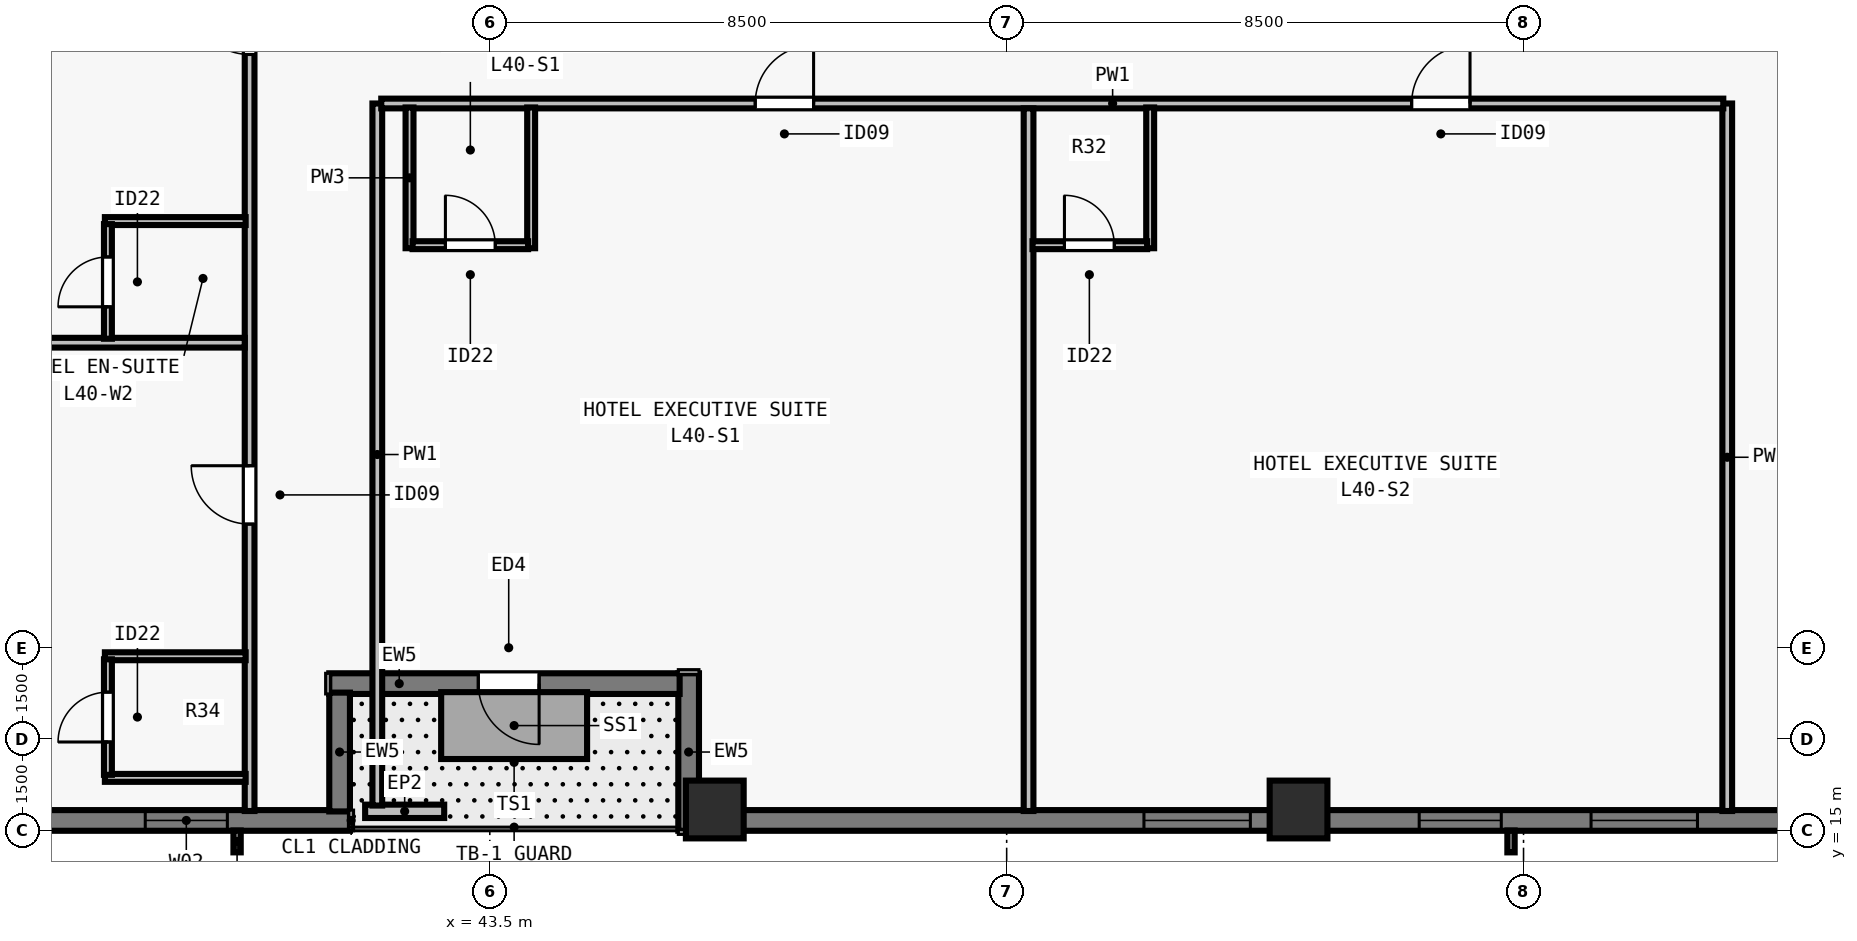
"""IFC4 building model, lengths in metres.
Left out: names, types, materials, properties, quantities, classifications, styles, units other than length and angle.
Written with IfcOpenShell. Run it as: python <this file> out.ifc"""

import sys

from ifc_helpers import new_model, si_unit, direction, frame, frame_2d, origin, origin_2d, place, context, subcontext, project, spatial, rectangle, extrude, element, fill, save


model = new_model("IFC4")
c1 = context("Model", 3, precision=1e-05, world=origin(), true_north=direction((0.0, 1.0)))
c2 = subcontext(c1, "Body", "Model", "MODEL_VIEW")
j1 = project(units=[si_unit("LENGTHUNIT", "METRE"), si_unit("PLANEANGLEUNIT", "RADIAN")], contexts=[c1])
p1 = place(None, origin())
s1 = spatial("IfcSite", under=j1, at=p1, CompositionType="ELEMENT")
p2 = place(p1, origin())
s2 = spatial("IfcBuilding", under=s1, at=p2, CompositionType="ELEMENT")
p3 = place(p2, frame((0.0, 0.0, 148.0)))
s3 = spatial("IfcBuildingStorey", under=s2, at=p3, CompositionType="ELEMENT", Elevation=148.0)
for number, where, z_axis, x_axis in (
    (1, (47.2, 15.35, 0.0), (0.0, 0.0, 1.0), (1.0, 0.0, 0.0)),
    (2, (56.8, 15.35, 0.0), (0.0, 0.0, 1.0), (1.0, 0.0, 0.0)),
):
    element("IfcColumn", number, at=place(p3, frame(where, z_axis=z_axis, x_axis=x_axis)), inside=s3, PredefinedType="COLUMN", context=c2, shape_type="SweptSolid", body=[
        extrude(rectangle(XDim=0.95, YDim=0.95, at=origin_2d()), origin(), (0.0, 0.0, 1.0), 3.5),
    ])
p4 = place(p3, frame((41.2, 15.17, 0.0), z_axis=(0.0, 0.0, 1.0), x_axis=(-1.0, 0.0, 0.0)))
e3 = element("IfcWall", 3, at=p4, inside=s3, PredefinedType="SOLIDWALL", context=c2, shape_type="SweptSolid", body=[
    extrude(rectangle(XDim=8.882, YDim=0.34, at=frame_2d((4.441, 0.0))), origin(), (0.0, 0.0, 1.0), 3.28),
])
p5 = place(p4, frame((2.016, 0.0, 0.8)))
e4 = element("IfcOpeningElement", 4, at=p5, cuts=e3, PredefinedType="OPENING", context=c2, shape_type="SweptSolid", body=[
    extrude(rectangle(XDim=1.35, YDim=1.66, at=frame_2d((0.675, 0.83))), frame((0.0, 0.18, 0.0), z_axis=(0.0, -1.0, 0.0), x_axis=(1.0, 0.0, 0.0)), (0.0, 0.0, 1.0), 0.36),
])
p6 = place(p3, frame((72.0, 15.17, 0.0), z_axis=(0.0, 0.0, 1.0), x_axis=(-1.0, 0.0, 0.0)))
e5 = element("IfcWall", 5, at=p6, inside=s3, PredefinedType="SOLIDWALL", context=c2, shape_type="SweptSolid", body=[
    extrude(rectangle(XDim=25.082, YDim=0.34, at=frame_2d((12.541, 0.0))), origin(), (0.0, 0.0, 1.0), 3.28),
])
p7 = place(p6, frame((4.063, 0.0, 0.8)))
e6 = element("IfcOpeningElement", 6, at=p7, cuts=e5, PredefinedType="OPENING", context=c2, shape_type="SweptSolid", body=[
    extrude(rectangle(XDim=1.35, YDim=1.66, at=frame_2d((0.675, 0.83))), frame((0.0, 0.18, 0.0), z_axis=(0.0, -1.0, 0.0), x_axis=(1.0, 0.0, 0.0)), (0.0, 0.0, 1.0), 0.36),
])
p8 = place(p6, frame((8.64, 0.0, 0.8)))
e7 = element("IfcOpeningElement", 7, at=p8, cuts=e5, PredefinedType="OPENING", context=c2, shape_type="SweptSolid", body=[
    extrude(rectangle(XDim=1.75, YDim=1.66, at=frame_2d((0.875, 0.83))), frame((0.0, 0.18, 0.0), z_axis=(0.0, -1.0, 0.0), x_axis=(1.0, 0.0, 0.0)), (0.0, 0.0, 1.0), 0.36),
])
p9 = place(p6, frame((11.866, 0.0, 0.8)))
e8 = element("IfcOpeningElement", 8, at=p9, cuts=e5, PredefinedType="OPENING", context=c2, shape_type="SweptSolid", body=[
    extrude(rectangle(XDim=1.35, YDim=1.66, at=frame_2d((0.675, 0.83))), frame((0.0, 0.18, 0.0), z_axis=(0.0, -1.0, 0.0), x_axis=(1.0, 0.0, 0.0)), (0.0, 0.0, 1.0), 0.36),
])
p10 = place(p6, frame((15.992, 0.0, 0.8)))
e9 = element("IfcOpeningElement", 9, at=p10, cuts=e5, PredefinedType="OPENING", context=c2, shape_type="SweptSolid", body=[
    extrude(rectangle(XDim=1.75, YDim=1.66, at=frame_2d((0.875, 0.83))), frame((0.0, 0.18, 0.0), z_axis=(0.0, -1.0, 0.0), x_axis=(1.0, 0.0, 0.0)), (0.0, 0.0, 1.0), 0.36),
])
p11 = place(p3, frame((46.77, 15.0, 0.0), z_axis=(0.0, 0.0, 1.0), x_axis=(0.0, 1.0, 0.0)))
e10 = element("IfcWall", 10, at=p11, inside=s3, PredefinedType="SOLIDWALL", context=c2, shape_type="SweptSolid", body=[
    extrude(rectangle(XDim=2.59, YDim=0.34, at=frame_2d((1.295, 0.0))), origin(), (0.0, 0.0, 1.0), 3.28),
])
p12 = place(p3, frame((46.622, 17.42, 0.0), z_axis=(0.0, 0.0, 1.0), x_axis=(-1.0, 0.0, 0.0)))
e11 = element("IfcWall", 11, at=p12, inside=s3, PredefinedType="SOLIDWALL", context=c2, shape_type="SweptSolid", body=[
    extrude(rectangle(XDim=5.762, YDim=0.34, at=frame_2d((2.881, 0.0))), origin(), (0.0, 0.0, 1.0), 3.28),
])
p13 = place(p12, frame((2.311, 0.0, 0.0)))
e12 = element("IfcOpeningElement", 12, at=p13, cuts=e11, PredefinedType="OPENING", context=c2, shape_type="SweptSolid", body=[
    extrude(rectangle(XDim=1.0, YDim=2.15, at=frame_2d((0.5, 1.075))), frame((0.0, 0.18, 0.0), z_axis=(0.0, -1.0, 0.0), x_axis=(1.0, 0.0, 0.0)), (0.0, 0.0, 1.0), 0.36),
])
p14 = place(p3, frame((41.03, 17.272, 0.0), z_axis=(0.0, 0.0, 1.0), x_axis=(0.0, -1.0, 0.0)))
e13 = element("IfcWall", 13, at=p14, inside=s3, PredefinedType="SOLIDWALL", context=c2, shape_type="SweptSolid", body=[
    extrude(rectangle(XDim=1.954, YDim=0.34, at=frame_2d((0.977, 0.0))), origin(), (0.0, 0.0, 1.0), 3.28),
])
p15 = place(p3, frame((41.45, 15.32, 0.0), z_axis=(0.0, 0.0, 1.0), x_axis=(1.0, 0.0, 0.0)))
e14 = element("IfcWall", 14, at=p15, inside=s3, PredefinedType="PARAPET", context=c2, shape_type="SweptSolid", body=[
    extrude(rectangle(XDim=1.3, YDim=0.22, at=frame_2d((0.65, 0.0))), origin(), (0.0, 0.0, 1.0), 0.55),
])
p16 = place(p3, frame((39.55, 15.325, 0.0), z_axis=(0.0, 0.0, 1.0), x_axis=(0.0, 1.0, 0.0)))
e15 = element("IfcWall", 15, at=p16, inside=s3, PredefinedType="PARTITIONING", context=c2, shape_type="SweptSolid", body=[
    extrude(rectangle(XDim=47.35, YDim=0.16, at=frame_2d((23.675, 0.0))), origin(), (0.0, 0.0, 1.0), 2.555),
])
p17 = place(p16, frame((4.718, 0.0, 0.0)))
e16 = element("IfcOpeningElement", 16, at=p17, cuts=e15, PredefinedType="OPENING", context=c2, shape_type="SweptSolid", body=[
    extrude(rectangle(XDim=0.96, YDim=2.15, at=frame_2d((0.48, 1.075))), frame((0.0, 0.09, 0.0), z_axis=(0.0, -1.0, 0.0), x_axis=(1.0, 0.0, 0.0)), (0.0, 0.0, 1.0), 0.18),
])
p18 = place(p16, frame((12.441, 0.0, 0.0)))
e17 = element("IfcOpeningElement", 17, at=p18, cuts=e15, PredefinedType="OPENING", context=c2, shape_type="SweptSolid", body=[
    extrude(rectangle(XDim=0.96, YDim=2.15, at=frame_2d((0.48, 1.075))), frame((0.0, 0.09, 0.0), z_axis=(0.0, -1.0, 0.0), x_axis=(1.0, 0.0, 0.0)), (0.0, 0.0, 1.0), 0.18),
])
p19 = place(p16, frame((20.301, 0.0, 0.0)))
e18 = element("IfcOpeningElement", 18, at=p19, cuts=e15, PredefinedType="OPENING", context=c2, shape_type="SweptSolid", body=[
    extrude(rectangle(XDim=0.96, YDim=2.15, at=frame_2d((0.48, 1.075))), frame((0.0, 0.09, 0.0), z_axis=(0.0, -1.0, 0.0), x_axis=(1.0, 0.0, 0.0)), (0.0, 0.0, 1.0), 0.18),
])
p20 = place(p16, frame((28.161, 0.0, 0.0)))
e19 = element("IfcOpeningElement", 19, at=p20, cuts=e15, PredefinedType="OPENING", context=c2, shape_type="SweptSolid", body=[
    extrude(rectangle(XDim=0.96, YDim=2.15, at=frame_2d((0.48, 1.075))), frame((0.0, 0.09, 0.0), z_axis=(0.0, -1.0, 0.0), x_axis=(1.0, 0.0, 0.0)), (0.0, 0.0, 1.0), 0.18),
])
p21 = place(p16, frame((36.021, 0.0, 0.0)))
e20 = element("IfcOpeningElement", 20, at=p21, cuts=e15, PredefinedType="OPENING", context=c2, shape_type="SweptSolid", body=[
    extrude(rectangle(XDim=0.96, YDim=2.15, at=frame_2d((0.48, 1.075))), frame((0.0, 0.09, 0.0), z_axis=(0.0, -1.0, 0.0), x_axis=(1.0, 0.0, 0.0)), (0.0, 0.0, 1.0), 0.18),
])
p22 = place(p16, frame((43.793, 0.0, 0.0)))
e21 = element("IfcOpeningElement", 21, at=p22, cuts=e15, PredefinedType="OPENING", context=c2, shape_type="SweptSolid", body=[
    extrude(rectangle(XDim=0.96, YDim=2.15, at=frame_2d((0.48, 1.075))), frame((0.0, 0.09, 0.0), z_axis=(0.0, -1.0, 0.0), x_axis=(1.0, 0.0, 0.0)), (0.0, 0.0, 1.0), 0.18),
])
p23 = place(p3, frame((41.65, 15.415, 0.0), z_axis=(0.0, 0.0, 1.0), x_axis=(0.0, 1.0, 0.0)))
e22 = element("IfcWall", 22, at=p23, inside=s3, PredefinedType="PARTITIONING", context=c2, shape_type="SweptSolid", body=[
    extrude(rectangle(XDim=11.545, YDim=0.16, at=frame_2d((5.772, 0.0))), origin(), (0.0, 0.0, 1.0), 3.28),
])
p24 = place(p3, frame((63.85, 15.325, 0.0), z_axis=(0.0, 0.0, 1.0), x_axis=(0.0, 1.0, 0.0)))
e23 = element("IfcWall", 23, at=p24, inside=s3, PredefinedType="PARTITIONING", context=c2, shape_type="SweptSolid", body=[
    extrude(rectangle(XDim=11.635, YDim=0.16, at=frame_2d((5.817, 0.0))), origin(), (0.0, 0.0, 1.0), 2.555),
])
p25 = place(p3, frame((41.715, 26.96, 0.0), z_axis=(0.0, 0.0, 1.0), x_axis=(1.0, 0.0, 0.0)))
e24 = element("IfcWall", 24, at=p25, inside=s3, PredefinedType="PARTITIONING", context=c2, shape_type="SweptSolid", body=[
    extrude(rectangle(XDim=22.07, YDim=0.16, at=frame_2d((11.035, 0.0))), origin(), (0.0, 0.0, 1.0), 3.28),
])
p26 = place(p25, frame((6.15, 0.0, 0.0)))
e25 = element("IfcOpeningElement", 25, at=p26, cuts=e24, PredefinedType="OPENING", context=c2, shape_type="SweptSolid", body=[
    extrude(rectangle(XDim=0.96, YDim=2.15, at=frame_2d((0.48, 1.075))), frame((0.0, 0.09, 0.0), z_axis=(0.0, -1.0, 0.0), x_axis=(1.0, 0.0, 0.0)), (0.0, 0.0, 1.0), 0.18),
])
p27 = place(p25, frame((16.945, 0.0, 0.0)))
e26 = element("IfcOpeningElement", 26, at=p27, cuts=e24, PredefinedType="OPENING", context=c2, shape_type="SweptSolid", body=[
    extrude(rectangle(XDim=0.96, YDim=2.15, at=frame_2d((0.48, 1.075))), frame((0.0, 0.09, 0.0), z_axis=(0.0, -1.0, 0.0), x_axis=(1.0, 0.0, 0.0)), (0.0, 0.0, 1.0), 0.18),
])
for number, where, z_axis, x_axis in (
    (27, (42.18, 24.58, 0.0), (0.0, 0.0, 1.0), (0.0, 1.0, 0.0)),
    (28, (44.18, 24.58, 0.0), (0.0, 0.0, 1.0), (0.0, 1.0, 0.0)),
):
    element("IfcWall", number, at=place(p3, frame(where, z_axis=z_axis, x_axis=x_axis)), inside=s3, PredefinedType="PLUMBINGWALL", context=c2, shape_type="SweptSolid", body=[
        extrude(rectangle(XDim=2.315, YDim=0.13, at=frame_2d((1.157, 0.0))), origin(), (0.0, 0.0, 1.0), 3.28),
    ])
p28 = place(p3, frame((42.23, 24.63, 0.0), z_axis=(0.0, 0.0, 1.0), x_axis=(1.0, 0.0, 0.0)))
e29 = element("IfcWall", 29, at=p28, inside=s3, PredefinedType="PLUMBINGWALL", context=c2, shape_type="SweptSolid", body=[
    extrude(rectangle(XDim=1.9, YDim=0.13, at=frame_2d((0.95, 0.0))), origin(), (0.0, 0.0, 1.0), 3.28),
])
p29 = place(p28, frame((0.54, 0.0, 0.0)))
e30 = element("IfcOpeningElement", 30, at=p29, cuts=e29, PredefinedType="OPENING", context=c2, shape_type="SweptSolid", body=[
    extrude(rectangle(XDim=0.82, YDim=2.1, at=frame_2d((0.41, 1.05))), frame((0.0, 0.075, 0.0), z_axis=(0.0, -1.0, 0.0), x_axis=(1.0, 0.0, 0.0)), (0.0, 0.0, 1.0), 0.15),
])
p30 = place(p3, frame((52.36, 15.325, 0.0), z_axis=(0.0, 0.0, 1.0), x_axis=(0.0, 1.0, 0.0)))
e31 = element("IfcWall", 31, at=p30, inside=s3, PredefinedType="PARTITIONING", context=c2, shape_type="SweptSolid", body=[
    extrude(rectangle(XDim=11.555, YDim=0.16, at=frame_2d((5.777, 0.0))), origin(), (0.0, 0.0, 1.0), 2.896),
])
p31 = place(p3, frame((54.36, 24.58, 0.0), z_axis=(0.0, 0.0, 1.0), x_axis=(0.0, 1.0, 0.0)))
e32 = element("IfcWall", 32, at=p31, inside=s3, PredefinedType="PLUMBINGWALL", context=c2, shape_type="SweptSolid", body=[
    extrude(rectangle(XDim=2.315, YDim=0.13, at=frame_2d((1.157, 0.0))), origin(), (0.0, 0.0, 1.0), 2.896),
])
p32 = place(p3, frame((52.425, 24.63, 0.0), z_axis=(0.0, 0.0, 1.0), x_axis=(1.0, 0.0, 0.0)))
e33 = element("IfcWall", 33, at=p32, inside=s3, PredefinedType="PLUMBINGWALL", context=c2, shape_type="SweptSolid", body=[
    extrude(rectangle(XDim=1.885, YDim=0.13, at=frame_2d((0.942, 0.0))), origin(), (0.0, 0.0, 1.0), 3.28),
])
p33 = place(p32, frame((0.525, 0.0, 0.0)))
e34 = element("IfcOpeningElement", 34, at=p33, cuts=e33, PredefinedType="OPENING", context=c2, shape_type="SweptSolid", body=[
    extrude(rectangle(XDim=0.82, YDim=2.1, at=frame_2d((0.41, 1.05))), frame((0.0, 0.075, 0.0), z_axis=(0.0, -1.0, 0.0), x_axis=(1.0, 0.0, 0.0)), (0.0, 0.0, 1.0), 0.15),
])
for number, where, z_axis, x_axis in (
    (35, (37.17, 15.87, 0.0), (0.0, 0.0, 1.0), (1.0, 0.0, 0.0)),
    (36, (37.17, 17.87, 0.0), (0.0, 0.0, 1.0), (1.0, 0.0, 0.0)),
):
    element("IfcWall", number, at=place(p3, frame(where, z_axis=z_axis, x_axis=x_axis)), inside=s3, PredefinedType="PLUMBINGWALL", context=c2, shape_type="SweptSolid", body=[
        extrude(rectangle(XDim=2.315, YDim=0.13, at=frame_2d((1.158, 0.0))), origin(), (0.0, 0.0, 1.0), 3.28),
    ])
p34 = place(p3, frame((37.22, 15.92, 0.0), z_axis=(0.0, 0.0, 1.0), x_axis=(0.0, 1.0, 0.0)))
e37 = element("IfcWall", 37, at=p34, inside=s3, PredefinedType="PLUMBINGWALL", context=c2, shape_type="SweptSolid", body=[
    extrude(rectangle(XDim=1.9, YDim=0.13, at=frame_2d((0.95, 0.0))), origin(), (0.0, 0.0, 1.0), 3.28),
])
p35 = place(p34, frame((0.54, 0.0, 0.0)))
e38 = element("IfcOpeningElement", 38, at=p35, cuts=e37, PredefinedType="OPENING", context=c2, shape_type="SweptSolid", body=[
    extrude(rectangle(XDim=0.82, YDim=2.1, at=frame_2d((0.41, 1.05))), frame((0.0, 0.075, 0.0), z_axis=(0.0, -1.0, 0.0), x_axis=(1.0, 0.0, 0.0)), (0.0, 0.0, 1.0), 0.15),
])
p36 = place(p3, frame((28.325, 23.027, 0.0), z_axis=(0.0, 0.0, 1.0), x_axis=(1.0, 0.0, 0.0)))
e39 = element("IfcWall", 39, at=p36, inside=s3, PredefinedType="PARTITIONING", context=c2, shape_type="SweptSolid", body=[
    extrude(rectangle(XDim=11.145, YDim=0.16, at=frame_2d((5.573, 0.0))), origin(), (0.0, 0.0, 1.0), 2.896),
])
p37 = place(p3, frame((37.17, 25.027, 0.0), z_axis=(0.0, 0.0, 1.0), x_axis=(1.0, 0.0, 0.0)))
e40 = element("IfcWall", 40, at=p37, inside=s3, PredefinedType="PLUMBINGWALL", context=c2, shape_type="SweptSolid", body=[
    extrude(rectangle(XDim=2.315, YDim=0.13, at=frame_2d((1.158, 0.0))), origin(), (0.0, 0.0, 1.0), 3.28),
])
p38 = place(p3, frame((37.22, 23.092, 0.0), z_axis=(0.0, 0.0, 1.0), x_axis=(0.0, 1.0, 0.0)))
e41 = element("IfcWall", 41, at=p38, inside=s3, PredefinedType="PLUMBINGWALL", context=c2, shape_type="SweptSolid", body=[
    extrude(rectangle(XDim=1.885, YDim=0.13, at=frame_2d((0.942, 0.0))), origin(), (0.0, 0.0, 1.0), 3.28),
])
p39 = place(p38, frame((0.525, 0.0, 0.0)))
e42 = element("IfcOpeningElement", 42, at=p39, cuts=e41, PredefinedType="OPENING", context=c2, shape_type="SweptSolid", body=[
    extrude(rectangle(XDim=0.82, YDim=2.1, at=frame_2d((0.41, 1.05))), frame((0.0, 0.075, 0.0), z_axis=(0.0, -1.0, 0.0), x_axis=(1.0, 0.0, 0.0)), (0.0, 0.0, 1.0), 0.15),
])
p40 = place(p5, origin())
e43 = element("IfcWindow", 43, at=p40, inside=s3, PartitioningType="SINGLE_PANEL", PredefinedType="WINDOW", context=c2, shape_type="SweptSolid", body=[
    extrude(rectangle(XDim=1.35, YDim=1.66, at=frame_2d((0.675, 0.83))), frame((0.0, -0.05, 0.0), z_axis=(0.0, -1.0, 0.0), x_axis=(1.0, 0.0, 0.0)), (0.0, 0.0, 1.0), 0.06),
])
fill(e4, e43)
p41 = place(p8, origin())
e44 = element("IfcWindow", 44, at=p41, inside=s3, PartitioningType="SINGLE_PANEL", PredefinedType="WINDOW", context=c2, shape_type="SweptSolid", body=[
    extrude(rectangle(XDim=1.75, YDim=1.66, at=frame_2d((0.875, 0.83))), frame((0.0, -0.05, 0.0), z_axis=(0.0, -1.0, 0.0), x_axis=(1.0, 0.0, 0.0)), (0.0, 0.0, 1.0), 0.06),
])
fill(e7, e44)
p42 = place(p9, origin())
e45 = element("IfcWindow", 45, at=p42, inside=s3, PartitioningType="SINGLE_PANEL", PredefinedType="WINDOW", context=c2, shape_type="SweptSolid", body=[
    extrude(rectangle(XDim=1.35, YDim=1.66, at=frame_2d((0.675, 0.83))), frame((0.0, -0.05, 0.0), z_axis=(0.0, -1.0, 0.0), x_axis=(1.0, 0.0, 0.0)), (0.0, 0.0, 1.0), 0.06),
])
fill(e8, e45)
p43 = place(p10, origin())
e46 = element("IfcWindow", 46, at=p43, inside=s3, PartitioningType="SINGLE_PANEL", PredefinedType="WINDOW", context=c2, shape_type="SweptSolid", body=[
    extrude(rectangle(XDim=1.75, YDim=1.66, at=frame_2d((0.875, 0.83))), frame((0.0, -0.05, 0.0), z_axis=(0.0, -1.0, 0.0), x_axis=(1.0, 0.0, 0.0)), (0.0, 0.0, 1.0), 0.06),
])
fill(e9, e46)
p44 = place(p13, origin())
e47 = element("IfcDoor", 47, at=p44, inside=s3, OperationType="SINGLE_SWING_LEFT", PredefinedType="DOOR", context=c2, shape_type="SweptSolid", body=[
    extrude(rectangle(XDim=1.0, YDim=2.15, at=frame_2d((0.5, 1.075))), frame((0.0, 0.025, 0.0), z_axis=(0.0, -1.0, 0.0), x_axis=(1.0, 0.0, 0.0)), (0.0, 0.0, 1.0), 0.05),
])
fill(e12, e47)
p45 = place(p29, origin())
e48 = element("IfcDoor", 48, at=p45, inside=s3, OperationType="SINGLE_SWING_LEFT", PredefinedType="DOOR", context=c2, shape_type="SweptSolid", body=[
    extrude(rectangle(XDim=0.82, YDim=2.1, at=frame_2d((0.41, 1.05))), frame((0.0, 0.025, 0.0), z_axis=(0.0, -1.0, 0.0), x_axis=(1.0, 0.0, 0.0)), (0.0, 0.0, 1.0), 0.05),
])
fill(e30, e48)
p46 = place(p26, origin())
e49 = element("IfcDoor", 49, at=p46, inside=s3, OperationType="SINGLE_SWING_RIGHT", PredefinedType="DOOR", context=c2, shape_type="SweptSolid", body=[
    extrude(rectangle(XDim=0.96, YDim=2.15, at=frame_2d((0.48, 1.075))), frame((0.0, 0.025, 0.0), z_axis=(0.0, -1.0, 0.0), x_axis=(1.0, 0.0, 0.0)), (0.0, 0.0, 1.0), 0.05),
])
fill(e25, e49)
p47 = place(p33, origin())
e50 = element("IfcDoor", 50, at=p47, inside=s3, OperationType="SINGLE_SWING_LEFT", PredefinedType="DOOR", context=c2, shape_type="SweptSolid", body=[
    extrude(rectangle(XDim=0.82, YDim=2.1, at=frame_2d((0.41, 1.05))), frame((0.0, 0.025, 0.0), z_axis=(0.0, -1.0, 0.0), x_axis=(1.0, 0.0, 0.0)), (0.0, 0.0, 1.0), 0.05),
])
fill(e34, e50)
p48 = place(p27, origin())
e51 = element("IfcDoor", 51, at=p48, inside=s3, OperationType="SINGLE_SWING_RIGHT", PredefinedType="DOOR", context=c2, shape_type="SweptSolid", body=[
    extrude(rectangle(XDim=0.96, YDim=2.15, at=frame_2d((0.48, 1.075))), frame((0.0, 0.025, 0.0), z_axis=(0.0, -1.0, 0.0), x_axis=(1.0, 0.0, 0.0)), (0.0, 0.0, 1.0), 0.05),
])
fill(e26, e51)
p49 = place(p35, origin())
e52 = element("IfcDoor", 52, at=p49, inside=s3, OperationType="SINGLE_SWING_LEFT", PredefinedType="DOOR", context=c2, shape_type="SweptSolid", body=[
    extrude(rectangle(XDim=0.82, YDim=2.1, at=frame_2d((0.41, 1.05))), frame((0.0, 0.025, 0.0), z_axis=(0.0, -1.0, 0.0), x_axis=(1.0, 0.0, 0.0)), (0.0, 0.0, 1.0), 0.05),
])
fill(e38, e52)
p50 = place(p17, origin())
e53 = element("IfcDoor", 53, at=p50, inside=s3, OperationType="SINGLE_SWING_RIGHT", PredefinedType="DOOR", context=c2, shape_type="SweptSolid", body=[
    extrude(rectangle(XDim=0.96, YDim=2.15, at=frame_2d((0.48, 1.075))), frame((0.0, 0.025, 0.0), z_axis=(0.0, -1.0, 0.0), x_axis=(1.0, 0.0, 0.0)), (0.0, 0.0, 1.0), 0.05),
])
fill(e16, e53)
p51 = place(p39, origin())
e54 = element("IfcDoor", 54, at=p51, inside=s3, OperationType="SINGLE_SWING_LEFT", PredefinedType="DOOR", context=c2, shape_type="SweptSolid", body=[
    extrude(rectangle(XDim=0.82, YDim=2.1, at=frame_2d((0.41, 1.05))), frame((0.0, 0.025, 0.0), z_axis=(0.0, -1.0, 0.0), x_axis=(1.0, 0.0, 0.0)), (0.0, 0.0, 1.0), 0.05),
])
fill(e42, e54)
p52 = place(p18, origin())
e55 = element("IfcDoor", 55, at=p52, inside=s3, OperationType="SINGLE_SWING_RIGHT", PredefinedType="DOOR", context=c2, shape_type="SweptSolid", body=[
    extrude(rectangle(XDim=0.96, YDim=2.15, at=frame_2d((0.48, 1.075))), frame((0.0, 0.025, 0.0), z_axis=(0.0, -1.0, 0.0), x_axis=(1.0, 0.0, 0.0)), (0.0, 0.0, 1.0), 0.05),
])
fill(e17, e55)
save(model, sys.argv[1])
